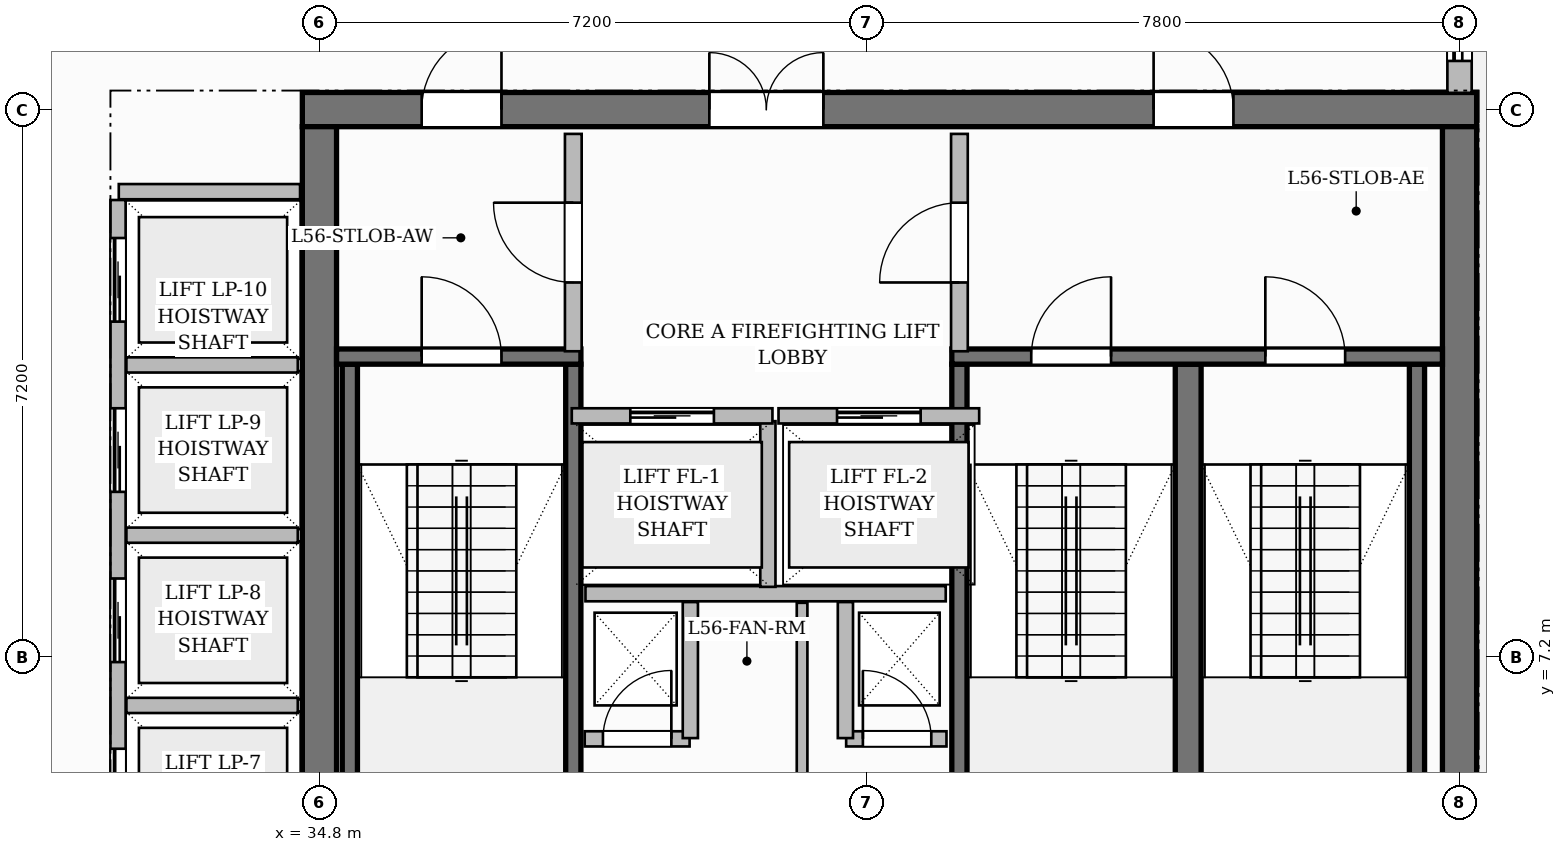
"""IFC4 building model, lengths in metres.
Left out: names, types, materials, properties, quantities, classifications, styles, units other than length and angle.
Written with IfcOpenShell. Run it as: python <this file> out.ifc"""

import sys

from ifc_helpers import new_model, si_unit, direction, frame, frame_2d, origin, place, context, subcontext, project, spatial, rectangle, extrude, source, transform, mapped, element, fill, save


model = new_model("IFC4")
c1 = context("Model", 3, precision=1e-05, world=origin(), true_north=direction((0.0, 1.0)))
c2 = subcontext(c1, "Body", "Model", "MODEL_VIEW")
j1 = project(units=[si_unit("LENGTHUNIT", "METRE"), si_unit("PLANEANGLEUNIT", "RADIAN")], contexts=[c1])
p1 = place(None, origin())
s1 = spatial("IfcSite", under=j1, at=p1, CompositionType="ELEMENT")
p2 = place(p1, origin())
s2 = spatial("IfcBuilding", under=s1, at=p2, CompositionType="ELEMENT")
p3 = place(p2, frame((0.0, 0.0, 225.0)))
s3 = spatial("IfcBuildingStorey", under=s2, at=p3, CompositionType="ELEMENT", Elevation=225.0)
p4 = place(p3, frame((34.575, 14.4, 0.0), z_axis=(0.0, 0.0, 1.0), x_axis=(1.0, 0.0, 0.0)))
e1 = element("IfcWall", 1, at=p4, inside=s3, PredefinedType="SHEAR", context=c2, shape_type="SweptSolid", body=[
    extrude(rectangle(XDim=15.45, YDim=0.45, at=frame_2d((7.725, 0.0))), origin(), (0.0, 0.0, 1.0), 3.85),
])
p5 = place(p4, frame((5.355, 0.0, 0.0)))
e2 = element("IfcOpeningElement", 2, at=p5, cuts=e1, PredefinedType="OPENING", context=c2, shape_type="SweptSolid", body=[
    extrude(rectangle(XDim=1.5, YDim=2.2, at=frame_2d((0.75, 1.1))), frame((0.0, 0.235, 0.0), z_axis=(0.0, -1.0, 0.0), x_axis=(1.0, 0.0, 0.0)), (0.0, 0.0, 1.0), 0.47),
])
p6 = place(p4, frame((1.57, 0.0, 0.0)))
e3 = element("IfcOpeningElement", 3, at=p6, cuts=e1, PredefinedType="OPENING", context=c2, shape_type="SweptSolid", body=[
    extrude(rectangle(XDim=1.05, YDim=2.15, at=frame_2d((0.525, 1.075))), frame((0.0, 0.235, 0.0), z_axis=(0.0, -1.0, 0.0), x_axis=(1.0, 0.0, 0.0)), (0.0, 0.0, 1.0), 0.47),
])
p7 = place(p4, frame((11.2, 0.0, 0.0)))
e4 = element("IfcOpeningElement", 4, at=p7, cuts=e1, PredefinedType="OPENING", context=c2, shape_type="SweptSolid", body=[
    extrude(rectangle(XDim=1.05, YDim=2.15, at=frame_2d((0.525, 1.075))), frame((0.0, 0.235, 0.0), z_axis=(0.0, -1.0, 0.0), x_axis=(1.0, 0.0, 0.0)), (0.0, 0.0, 1.0), 0.47),
])
for number, where, z_axis, x_axis in (
    (5, (34.8, 3.825, 0.0), (0.0, 0.0, 1.0), (0.0, 1.0, 0.0)),
    (6, (49.8, 3.825, 0.0), (0.0, 0.0, 1.0), (0.0, 1.0, 0.0)),
):
    element("IfcWall", number, at=place(p3, frame(where, z_axis=z_axis, x_axis=x_axis)), inside=s3, PredefinedType="SHEAR", context=c2, shape_type="SweptSolid", body=[
        extrude(rectangle(XDim=10.35, YDim=0.45, at=frame_2d((5.175, 0.0))), origin(), (0.0, 0.0, 1.0), 3.85),
    ])
for number, where, z_axis, x_axis in (
    (7, (35.2, 4.1, 0.0), (0.0, 0.0, 1.0), (0.0, 1.0, 0.0)),
    (8, (38.14, 4.1, 0.0), (0.0, 0.0, 1.0), (0.0, 1.0, 0.0)),
):
    element("IfcWall", number, at=place(p3, frame(where, z_axis=z_axis, x_axis=x_axis)), inside=s3, PredefinedType="SHEAR", context=c2, shape_type="SweptSolid", body=[
        extrude(rectangle(XDim=6.95, YDim=0.2, at=frame_2d((3.475, 0.0))), origin(), (0.0, 0.0, 1.0), 3.85),
    ])
p8 = place(p3, frame((35.025, 11.15, 0.0), z_axis=(0.0, 0.0, 1.0), x_axis=(1.0, 0.0, 0.0)))
e9 = element("IfcWall", 9, at=p8, inside=s3, PredefinedType="SHEAR", context=c2, shape_type="SweptSolid", body=[
    extrude(rectangle(XDim=3.215, YDim=0.2, at=frame_2d((1.607, 0.0))), origin(), (0.0, 0.0, 1.0), 3.85),
])
p9 = place(p8, frame((1.12, 0.0, 0.0)))
e10 = element("IfcOpeningElement", 10, at=p9, cuts=e9, PredefinedType="OPENING", context=c2, shape_type="SweptSolid", body=[
    extrude(rectangle(XDim=1.05, YDim=2.2, at=frame_2d((0.525, 1.1))), frame((0.0, 0.11, 0.0), z_axis=(0.0, -1.0, 0.0), x_axis=(1.0, 0.0, 0.0)), (0.0, 0.0, 1.0), 0.22),
])
p10 = place(p3, frame((43.22, 4.1, 0.0), z_axis=(0.0, 0.0, 1.0), x_axis=(0.0, 1.0, 0.0)))
e11 = element("IfcWall", 11, at=p10, inside=s3, PredefinedType="SHEAR", context=c2, shape_type="SweptSolid", body=[
    extrude(rectangle(XDim=6.95, YDim=0.2, at=frame_2d((3.475, 0.0))), origin(), (0.0, 0.0, 1.0), 3.85),
])
p11 = place(p3, frame((46.23, 4.1, 0.0), z_axis=(0.0, 0.0, 1.0), x_axis=(0.0, 1.0, 0.0)))
e12 = element("IfcWall", 12, at=p11, inside=s3, PredefinedType="SHEAR", context=c2, shape_type="SweptSolid", body=[
    extrude(rectangle(XDim=6.95, YDim=0.34, at=frame_2d((3.475, 0.0))), origin(), (0.0, 0.0, 1.0), 3.85),
])
p12 = place(p3, frame((49.24, 4.1, 0.0), z_axis=(0.0, 0.0, 1.0), x_axis=(0.0, 1.0, 0.0)))
e13 = element("IfcWall", 13, at=p12, inside=s3, PredefinedType="SHEAR", context=c2, shape_type="SweptSolid", body=[
    extrude(rectangle(XDim=6.95, YDim=0.2, at=frame_2d((3.475, 0.0))), origin(), (0.0, 0.0, 1.0), 3.85),
])
p13 = place(p3, frame((43.12, 11.15, 0.0), z_axis=(0.0, 0.0, 1.0), x_axis=(1.0, 0.0, 0.0)))
e14 = element("IfcWall", 14, at=p13, inside=s3, PredefinedType="SHEAR", context=c2, shape_type="SweptSolid", body=[
    extrude(rectangle(XDim=6.455, YDim=0.2, at=frame_2d((3.228, 0.0))), origin(), (0.0, 0.0, 1.0), 3.85),
])
p14 = place(p13, frame((1.045, 0.0, 0.0)))
e15 = element("IfcOpeningElement", 15, at=p14, cuts=e14, PredefinedType="OPENING", context=c2, shape_type="SweptSolid", body=[
    extrude(rectangle(XDim=1.05, YDim=2.2, at=frame_2d((0.525, 1.1))), frame((0.0, 0.11, 0.0), z_axis=(0.0, -1.0, 0.0), x_axis=(1.0, 0.0, 0.0)), (0.0, 0.0, 1.0), 0.22),
])
p15 = place(p13, frame((4.125, 0.0, 0.0)))
e16 = element("IfcOpeningElement", 16, at=p15, cuts=e14, PredefinedType="OPENING", context=c2, shape_type="SweptSolid", body=[
    extrude(rectangle(XDim=1.05, YDim=2.2, at=frame_2d((0.525, 1.1))), frame((0.0, 0.11, 0.0), z_axis=(0.0, -1.0, 0.0), x_axis=(1.0, 0.0, 0.0)), (0.0, 0.0, 1.0), 0.22),
])
p16 = place(p3, frame((38.3, 8.03, 0.0), z_axis=(0.0, 0.0, 1.0), x_axis=(1.0, 0.0, 0.0)))
e17 = element("IfcWall", 17, at=p16, inside=s3, PredefinedType="PARTITIONING", context=c2, shape_type="SweptSolid", body=[
    extrude(rectangle(XDim=4.74, YDim=0.2, at=frame_2d((2.37, 0.0))), origin(), (0.0, 0.0, 1.0), 3.6),
])
p17 = place(p3, frame((40.7, 8.12, 0.0), z_axis=(0.0, 0.0, 1.0), x_axis=(0.0, 1.0, 0.0)))
e18 = element("IfcWall", 18, at=p17, inside=s3, PredefinedType="PARTITIONING", context=c2, shape_type="SweptSolid", body=[
    extrude(rectangle(XDim=2.18, YDim=0.2, at=frame_2d((1.09, 0.0))), origin(), (0.0, 0.0, 1.0), 3.6),
])
p18 = place(p3, frame((38.14, 11.22, 0.0), z_axis=(0.0, 0.0, 1.0), x_axis=(0.0, 1.0, 0.0)))
e19 = element("IfcWall", 19, at=p18, inside=s3, PredefinedType="PARTITIONING", context=c2, shape_type="SweptSolid", body=[
    extrude(rectangle(XDim=2.86, YDim=0.22, at=frame_2d((1.43, 0.0))), origin(), (0.0, 0.0, 1.0), 3.6),
])
p19 = place(p18, frame((0.905, 0.0, 0.0)))
e20 = element("IfcOpeningElement", 20, at=p19, cuts=e19, PredefinedType="OPENING", context=c2, shape_type="SweptSolid", body=[
    extrude(rectangle(XDim=1.05, YDim=2.15, at=frame_2d((0.525, 1.075))), frame((0.0, 0.12, 0.0), z_axis=(0.0, -1.0, 0.0), x_axis=(1.0, 0.0, 0.0)), (0.0, 0.0, 1.0), 0.24),
])
p20 = place(p3, frame((43.22, 11.22, 0.0), z_axis=(0.0, 0.0, 1.0), x_axis=(0.0, 1.0, 0.0)))
e21 = element("IfcWall", 21, at=p20, inside=s3, PredefinedType="PARTITIONING", context=c2, shape_type="SweptSolid", body=[
    extrude(rectangle(XDim=2.86, YDim=0.22, at=frame_2d((1.43, 0.0))), origin(), (0.0, 0.0, 1.0), 3.6),
])
p21 = place(p20, frame((0.905, 0.0, 0.0)))
e22 = element("IfcOpeningElement", 22, at=p21, cuts=e21, PredefinedType="OPENING", context=c2, shape_type="SweptSolid", body=[
    extrude(rectangle(XDim=1.05, YDim=2.15, at=frame_2d((0.525, 1.075))), frame((0.0, 0.12, 0.0), z_axis=(0.0, -1.0, 0.0), x_axis=(1.0, 0.0, 0.0)), (0.0, 0.0, 1.0), 0.24),
])
p22 = place(p3, frame((38.29, 6.12, 0.0), z_axis=(0.0, 0.0, 1.0), x_axis=(1.0, 0.0, 0.0)))
e23 = element("IfcWall", 23, at=p22, inside=s3, PredefinedType="PARTITIONING", context=c2, shape_type="SweptSolid", body=[
    extrude(rectangle(XDim=1.38, YDim=0.2, at=frame_2d((0.69, 0.0))), origin(), (0.0, 0.0, 1.0), 3.6),
])
p23 = place(p22, frame((0.24, 0.0, 0.0)))
e24 = element("IfcOpeningElement", 24, at=p23, cuts=e23, PredefinedType="OPENING", context=c2, shape_type="SweptSolid", body=[
    extrude(rectangle(XDim=0.9, YDim=2.1, at=frame_2d((0.45, 1.05))), frame((0.0, 0.11, 0.0), z_axis=(0.0, -1.0, 0.0), x_axis=(1.0, 0.0, 0.0)), (0.0, 0.0, 1.0), 0.22),
])
p24 = place(p3, frame((39.68, 6.13, 0.0), z_axis=(0.0, 0.0, 1.0), x_axis=(0.0, 1.0, 0.0)))
e25 = element("IfcWall", 25, at=p24, inside=s3, PredefinedType="PARTITIONING", context=c2, shape_type="SweptSolid", body=[
    extrude(rectangle(XDim=1.79, YDim=0.2, at=frame_2d((0.895, 0.0))), origin(), (0.0, 0.0, 1.0), 3.6),
])
p25 = place(p3, frame((41.73, 6.12, 0.0), z_axis=(0.0, 0.0, 1.0), x_axis=(1.0, 0.0, 0.0)))
e26 = element("IfcWall", 26, at=p25, inside=s3, PredefinedType="PARTITIONING", context=c2, shape_type="SweptSolid", body=[
    extrude(rectangle(XDim=1.32, YDim=0.2, at=frame_2d((0.66, 0.0))), origin(), (0.0, 0.0, 1.0), 3.6),
])
p26 = place(p25, frame((0.22, 0.0, 0.0)))
e27 = element("IfcOpeningElement", 27, at=p26, cuts=e26, PredefinedType="OPENING", context=c2, shape_type="SweptSolid", body=[
    extrude(rectangle(XDim=0.9, YDim=2.1, at=frame_2d((0.45, 1.05))), frame((0.0, 0.11, 0.0), z_axis=(0.0, -1.0, 0.0), x_axis=(1.0, 0.0, 0.0)), (0.0, 0.0, 1.0), 0.22),
])
p27 = place(p3, frame((41.72, 6.13, 0.0), z_axis=(0.0, 0.0, 1.0), x_axis=(0.0, 1.0, 0.0)))
e28 = element("IfcWall", 28, at=p27, inside=s3, PredefinedType="PARTITIONING", context=c2, shape_type="SweptSolid", body=[
    extrude(rectangle(XDim=1.79, YDim=0.2, at=frame_2d((0.895, 0.0))), origin(), (0.0, 0.0, 1.0), 3.6),
])
p28 = place(p3, frame((41.15, 3.845, 0.0), z_axis=(0.0, 0.0, 1.0), x_axis=(0.0, 1.0, 0.0)))
e29 = element("IfcWall", 29, at=p28, inside=s3, PredefinedType="PARTITIONING", context=c2, shape_type="SweptSolid", body=[
    extrude(rectangle(XDim=4.065, YDim=0.14, at=frame_2d((2.032, 0.0))), origin(), (0.0, 0.0, 1.0), 3.6),
])
p29 = place(p3, frame((32.16, 13.32, 0.0), z_axis=(0.0, 0.0, 1.0), x_axis=(1.0, 0.0, 0.0)))
e30 = element("IfcWall", 30, at=p29, inside=s3, PredefinedType="PARTITIONING", context=c2, shape_type="SweptSolid", body=[
    extrude(rectangle(XDim=2.385, YDim=0.2, at=frame_2d((1.192, 0.0))), origin(), (0.0, 0.0, 1.0), 3.6),
])
p30 = place(p3, frame((32.15, 4.39, 0.0), z_axis=(0.0, 0.0, 1.0), x_axis=(0.0, 1.0, 0.0)))
e31 = element("IfcWall", 31, at=p30, inside=s3, PredefinedType="PARTITIONING", context=c2, shape_type="SweptSolid", body=[
    extrude(rectangle(XDim=8.82, YDim=0.2, at=frame_2d((4.41, 0.0))), origin(), (0.0, 0.0, 1.0), 3.6),
])
p31 = place(p30, frame((0.5, 0.0, 0.0)))
e32 = element("IfcOpeningElement", 32, at=p31, cuts=e31, PredefinedType="OPENING", context=c2, shape_type="SweptSolid", body=[
    extrude(rectangle(XDim=1.1, YDim=2.2, at=frame_2d((0.55, 1.1))), frame((0.0, 0.11, 0.0), z_axis=(0.0, -1.0, 0.0), x_axis=(1.0, 0.0, 0.0)), (0.0, 0.0, 1.0), 0.22),
])
p32 = place(p30, frame((2.74, 0.0, 0.0)))
e33 = element("IfcOpeningElement", 33, at=p32, cuts=e31, PredefinedType="OPENING", context=c2, shape_type="SweptSolid", body=[
    extrude(rectangle(XDim=1.1, YDim=2.2, at=frame_2d((0.55, 1.1))), frame((0.0, 0.11, 0.0), z_axis=(0.0, -1.0, 0.0), x_axis=(1.0, 0.0, 0.0)), (0.0, 0.0, 1.0), 0.22),
])
p33 = place(p30, frame((4.98, 0.0, 0.0)))
e34 = element("IfcOpeningElement", 34, at=p33, cuts=e31, PredefinedType="OPENING", context=c2, shape_type="SweptSolid", body=[
    extrude(rectangle(XDim=1.1, YDim=2.2, at=frame_2d((0.55, 1.1))), frame((0.0, 0.11, 0.0), z_axis=(0.0, -1.0, 0.0), x_axis=(1.0, 0.0, 0.0)), (0.0, 0.0, 1.0), 0.22),
])
p34 = place(p30, frame((7.22, 0.0, 0.0)))
e35 = element("IfcOpeningElement", 35, at=p34, cuts=e31, PredefinedType="OPENING", context=c2, shape_type="SweptSolid", body=[
    extrude(rectangle(XDim=1.1, YDim=2.2, at=frame_2d((0.55, 1.1))), frame((0.0, 0.11, 0.0), z_axis=(0.0, -1.0, 0.0), x_axis=(1.0, 0.0, 0.0)), (0.0, 0.0, 1.0), 0.22),
])
for number, where, z_axis, x_axis in (
    (36, (32.26, 6.56, 0.0), (0.0, 0.0, 1.0), (1.0, 0.0, 0.0)),
    (37, (32.26, 8.8, 0.0), (0.0, 0.0, 1.0), (1.0, 0.0, 0.0)),
    (38, (32.26, 11.04, 0.0), (0.0, 0.0, 1.0), (1.0, 0.0, 0.0)),
):
    element("IfcWall", number, at=place(p3, frame(where, z_axis=z_axis, x_axis=x_axis)), inside=s3, PredefinedType="PARTITIONING", context=c2, shape_type="SweptSolid", body=[
        extrude(rectangle(XDim=2.255, YDim=0.2, at=frame_2d((1.127, 0.0))), origin(), (0.0, 0.0, 1.0), 3.6),
    ])
p35 = place(p3, frame((38.12, 10.37, 0.0), z_axis=(0.0, 0.0, 1.0), x_axis=(1.0, 0.0, 0.0)))
e39 = element("IfcWall", 39, at=p35, inside=s3, PredefinedType="PARTITIONING", context=c2, shape_type="SweptSolid", body=[
    extrude(rectangle(XDim=2.64, YDim=0.2, at=frame_2d((1.32, 0.0))), origin(), (0.0, 0.0, 1.0), 3.6),
])
p36 = place(p35, frame((0.77, 0.0, 0.0)))
e40 = element("IfcOpeningElement", 40, at=p36, cuts=e39, PredefinedType="OPENING", context=c2, shape_type="SweptSolid", body=[
    extrude(rectangle(XDim=1.1, YDim=2.2, at=frame_2d((0.55, 1.1))), frame((0.0, 0.11, 0.0), z_axis=(0.0, -1.0, 0.0), x_axis=(1.0, 0.0, 0.0)), (0.0, 0.0, 1.0), 0.22),
])
p37 = place(p3, frame((40.84, 10.37, 0.0), z_axis=(0.0, 0.0, 1.0), x_axis=(1.0, 0.0, 0.0)))
e41 = element("IfcWall", 41, at=p37, inside=s3, PredefinedType="PARTITIONING", context=c2, shape_type="SweptSolid", body=[
    extrude(rectangle(XDim=2.64, YDim=0.2, at=frame_2d((1.32, 0.0))), origin(), (0.0, 0.0, 1.0), 3.6),
])
p38 = place(p37, frame((0.77, 0.0, 0.0)))
e42 = element("IfcOpeningElement", 42, at=p38, cuts=e41, PredefinedType="OPENING", context=c2, shape_type="SweptSolid", body=[
    extrude(rectangle(XDim=1.1, YDim=2.2, at=frame_2d((0.55, 1.1))), frame((0.0, 0.11, 0.0), z_axis=(0.0, -1.0, 0.0), x_axis=(1.0, 0.0, 0.0)), (0.0, 0.0, 1.0), 0.22),
])
p39 = place(p3, frame((49.8, 14.62, 0.0), z_axis=(0.0, 0.0, 1.0), x_axis=(0.0, 1.0, 0.0)))
e43 = element("IfcWall", 43, at=p39, inside=s3, PredefinedType="SOLIDWALL", context=c2, shape_type="SweptSolid", body=[
    extrude(rectangle(XDim=6.93, YDim=0.32, at=frame_2d((3.465, 0.0))), origin(), (0.0, 0.0, 1.0), 3.135),
])
p40 = place(p39, frame((0.42, 0.0, 0.0)))
e44 = element("IfcOpeningElement", 44, at=p40, cuts=e43, PredefinedType="OPENING", context=c2, shape_type="SweptSolid", body=[
    extrude(rectangle(XDim=1.2, YDim=2.2, at=frame_2d((0.6, 1.1))), frame((0.0, 0.17, 0.0), z_axis=(0.0, -1.0, 0.0), x_axis=(1.0, 0.0, 0.0)), (0.0, 0.0, 1.0), 0.34),
])
p41 = place(p39, frame((3.384, 0.0, 0.8)))
e45 = element("IfcOpeningElement", 45, at=p41, cuts=e43, PredefinedType="OPENING", context=c2, shape_type="SweptSolid", body=[
    extrude(rectangle(XDim=1.8, YDim=1.85, at=frame_2d((0.9, 0.925))), frame((0.0, 0.17, 0.0), z_axis=(0.0, -1.0, 0.0), x_axis=(1.0, 0.0, 0.0)), (0.0, 0.0, 1.0), 0.34),
])
m1 = source(origin(), c2, "Body", "SweptSolid", [
    extrude(rectangle(XDim=1.05, YDim=2.2, at=frame_2d((0.525, 1.1))), frame((0.0, 0.025, 0.0), z_axis=(0.0, -1.0, 0.0), x_axis=(1.0, 0.0, 0.0)), (0.0, 0.0, 1.0), 0.05),
])
p42 = place(p9, origin())
e46 = element("IfcDoor", 46, at=p42, inside=s3, OperationType="SINGLE_SWING_LEFT", PredefinedType="DOOR", context=c2, shape_type="MappedRepresentation", body=[
    mapped(m1, transform((0.0, 0.0, 0.0), scale=1.0)),
])
fill(e10, e46)
p43 = place(p14, origin())
e47 = element("IfcDoor", 47, at=p43, inside=s3, OperationType="SINGLE_SWING_RIGHT", PredefinedType="DOOR", context=c2, shape_type="MappedRepresentation", body=[
    mapped(m1, transform((0.0, 0.0, 0.0), scale=1.0)),
])
fill(e15, e47)
p44 = place(p15, origin())
e48 = element("IfcDoor", 48, at=p44, inside=s3, OperationType="SINGLE_SWING_LEFT", PredefinedType="DOOR", context=c2, shape_type="MappedRepresentation", body=[
    mapped(m1, transform((0.0, 0.0, 0.0), scale=1.0)),
])
fill(e16, e48)
m2 = source(origin(), c2, "Body", "SweptSolid", [
    extrude(rectangle(XDim=1.05, YDim=2.15, at=frame_2d((0.525, 1.075))), frame((0.0, 0.025, 0.0), z_axis=(0.0, -1.0, 0.0), x_axis=(1.0, 0.0, 0.0)), (0.0, 0.0, 1.0), 0.05),
])
p45 = place(p19, origin())
e49 = element("IfcDoor", 49, at=p45, inside=s3, OperationType="SINGLE_SWING_RIGHT", PredefinedType="DOOR", context=c2, shape_type="MappedRepresentation", body=[
    mapped(m2, transform((0.0, 0.0, 0.0), scale=1.0)),
])
fill(e20, e49)
p46 = place(p21, origin())
e50 = element("IfcDoor", 50, at=p46, inside=s3, OperationType="SINGLE_SWING_LEFT", PredefinedType="DOOR", context=c2, shape_type="MappedRepresentation", body=[
    mapped(m2, transform((0.0, 0.0, 0.0), scale=1.0)),
])
fill(e22, e50)
m3 = source(origin(), c2, "Body", "SweptSolid", [
    extrude(rectangle(XDim=1.5, YDim=2.2, at=frame_2d((0.75, 1.1))), frame((0.0, 0.025, 0.0), z_axis=(0.0, -1.0, 0.0), x_axis=(1.0, 0.0, 0.0)), (0.0, 0.0, 1.0), 0.05),
])
p47 = place(p5, origin())
e51 = element("IfcDoor", 51, at=p47, inside=s3, OperationType="DOUBLE_DOOR_SINGLE_SWING", PredefinedType="DOOR", context=c2, shape_type="MappedRepresentation", body=[
    mapped(m3, transform((0.0, 0.0, 0.0), scale=1.0)),
])
fill(e2, e51)
p48 = place(p6, origin())
e52 = element("IfcDoor", 52, at=p48, inside=s3, OperationType="SINGLE_SWING_RIGHT", PredefinedType="DOOR", context=c2, shape_type="MappedRepresentation", body=[
    mapped(m2, transform((0.0, 0.0, 0.0), scale=1.0)),
])
fill(e3, e52)
p49 = place(p7, origin())
e53 = element("IfcDoor", 53, at=p49, inside=s3, OperationType="SINGLE_SWING_LEFT", PredefinedType="DOOR", context=c2, shape_type="MappedRepresentation", body=[
    mapped(m2, transform((0.0, 0.0, 0.0), scale=1.0)),
])
fill(e4, e53)
m4 = source(origin(), c2, "Body", "SweptSolid", [
    extrude(rectangle(XDim=0.9, YDim=2.1, at=frame_2d((0.45, 1.05))), frame((0.0, 0.025, 0.0), z_axis=(0.0, -1.0, 0.0), x_axis=(1.0, 0.0, 0.0)), (0.0, 0.0, 1.0), 0.05),
])
p50 = place(p23, origin())
e54 = element("IfcDoor", 54, at=p50, inside=s3, OperationType="SINGLE_SWING_RIGHT", PredefinedType="DOOR", context=c2, shape_type="MappedRepresentation", body=[
    mapped(m4, transform((0.0, 0.0, 0.0), scale=1.0)),
])
fill(e24, e54)
p51 = place(p26, origin())
e55 = element("IfcDoor", 55, at=p51, inside=s3, OperationType="SINGLE_SWING_LEFT", PredefinedType="DOOR", context=c2, shape_type="MappedRepresentation", body=[
    mapped(m4, transform((0.0, 0.0, 0.0), scale=1.0)),
])
fill(e27, e55)
m5 = source(origin(), c2, "Body", "SweptSolid", [
    extrude(rectangle(XDim=1.1, YDim=2.2, at=frame_2d((0.55, 1.1))), frame((0.0, 0.025, 0.0), z_axis=(0.0, -1.0, 0.0), x_axis=(1.0, 0.0, 0.0)), (0.0, 0.0, 1.0), 0.05),
])
p52 = place(p36, origin())
e56 = element("IfcDoor", 56, at=p52, inside=s3, OperationType="SLIDING_TO_LEFT", PredefinedType="DOOR", context=c2, shape_type="MappedRepresentation", body=[
    mapped(m5, transform((0.0, 0.0, 0.0), scale=1.0)),
])
fill(e40, e56)
p53 = place(p38, origin())
e57 = element("IfcDoor", 57, at=p53, inside=s3, OperationType="SLIDING_TO_LEFT", PredefinedType="DOOR", context=c2, shape_type="MappedRepresentation", body=[
    mapped(m5, transform((0.0, 0.0, 0.0), scale=1.0)),
])
fill(e42, e57)
p54 = place(p31, origin())
e58 = element("IfcDoor", 58, at=p54, inside=s3, OperationType="SLIDING_TO_LEFT", PredefinedType="DOOR", context=c2, shape_type="MappedRepresentation", body=[
    mapped(m5, transform((0.0, 0.0, 0.0), scale=1.0)),
])
fill(e32, e58)
p55 = place(p32, origin())
e59 = element("IfcDoor", 59, at=p55, inside=s3, OperationType="SLIDING_TO_LEFT", PredefinedType="DOOR", context=c2, shape_type="MappedRepresentation", body=[
    mapped(m5, transform((0.0, 0.0, 0.0), scale=1.0)),
])
fill(e33, e59)
p56 = place(p33, origin())
e60 = element("IfcDoor", 60, at=p56, inside=s3, OperationType="SLIDING_TO_LEFT", PredefinedType="DOOR", context=c2, shape_type="MappedRepresentation", body=[
    mapped(m5, transform((0.0, 0.0, 0.0), scale=1.0)),
])
fill(e34, e60)
p57 = place(p34, origin())
e61 = element("IfcDoor", 61, at=p57, inside=s3, OperationType="SLIDING_TO_LEFT", PredefinedType="DOOR", context=c2, shape_type="MappedRepresentation", body=[
    mapped(m5, transform((0.0, 0.0, 0.0), scale=1.0)),
])
fill(e35, e61)
m6 = source(origin(), c2, "Body", "SweptSolid", [
    extrude(rectangle(XDim=1.2, YDim=2.2, at=frame_2d((0.6, 1.1))), frame((0.0, 0.025, 0.0), z_axis=(0.0, -1.0, 0.0), x_axis=(1.0, 0.0, 0.0)), (0.0, 0.0, 1.0), 0.05),
])
p58 = place(p40, origin())
e62 = element("IfcDoor", 62, at=p58, inside=s3, OperationType="SLIDING_TO_LEFT", PredefinedType="DOOR", context=c2, shape_type="MappedRepresentation", body=[
    mapped(m6, transform((0.0, 0.0, 0.0), scale=1.0)),
])
fill(e44, e62)
save(model, sys.argv[1])
